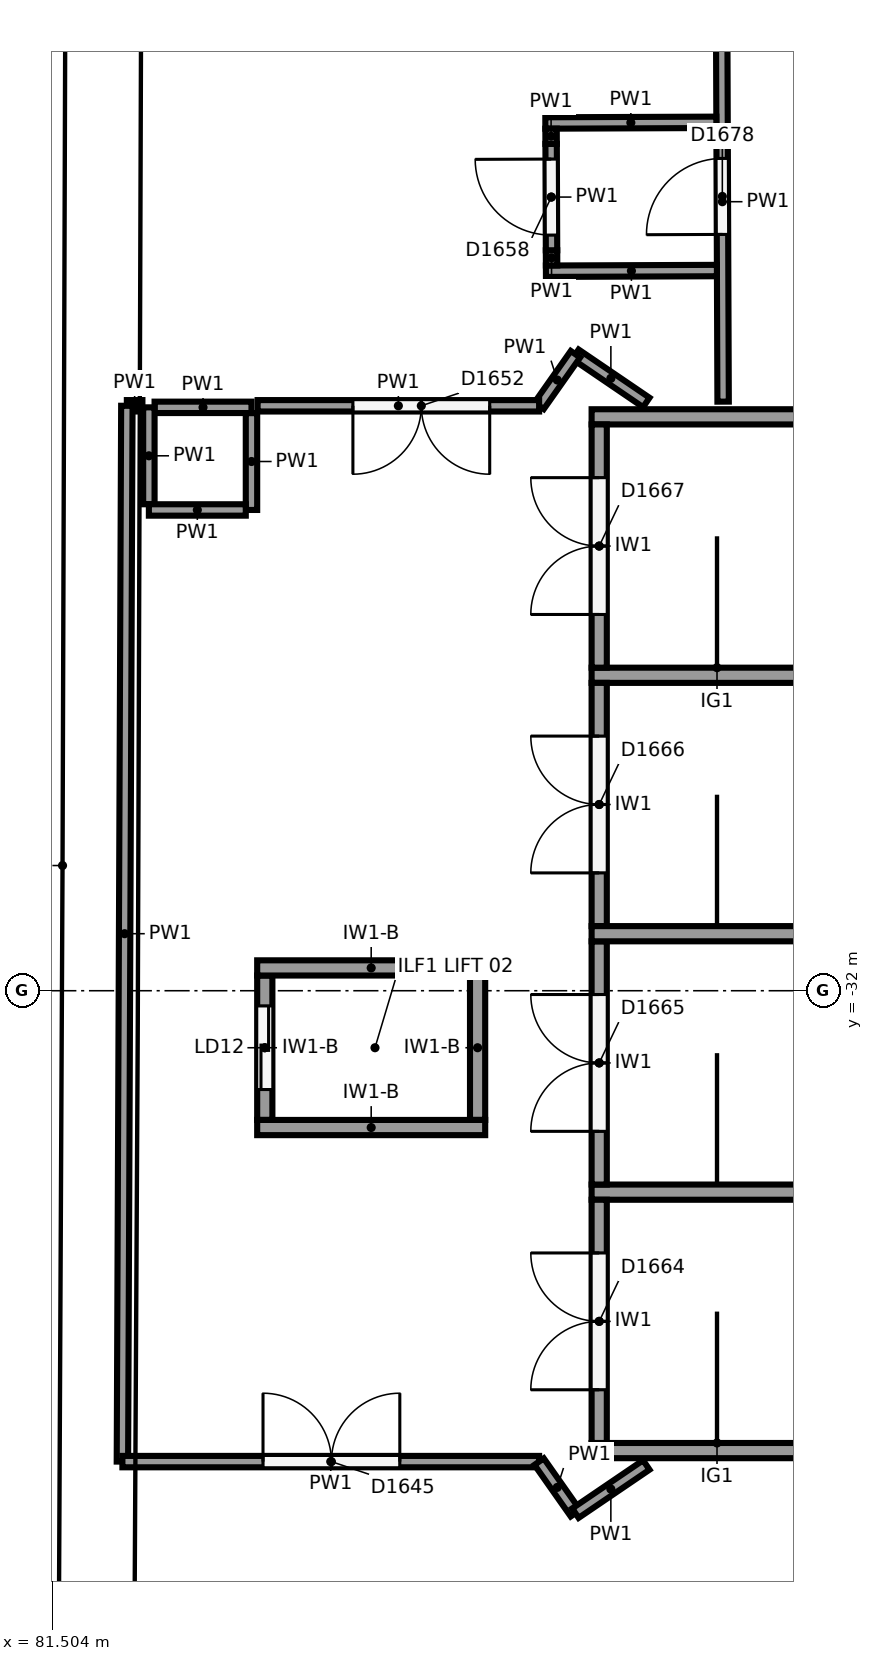
"""IFC4 building model, lengths in metres.
Left out: names, types, materials, properties, quantities, classifications, styles, units other than length and angle.
Written with IfcOpenShell. Run it as: python <this file> out.ifc"""

import sys

from ifc_helpers import new_model, si_unit, direction, frame, frame_2d, origin, origin_2d, place, context, subcontext, project, spatial, rectangle, circle, extrude, element, fill, save


model = new_model("IFC4")
c1 = context("Model", 3, precision=1e-05, world=origin(), true_north=direction((0.0, 1.0)))
c2 = subcontext(c1, "Body", "Model", "MODEL_VIEW")
j1 = project(units=[si_unit("LENGTHUNIT", "METRE"), si_unit("PLANEANGLEUNIT", "RADIAN")], contexts=[c1])
p1 = place(None, origin())
s1 = spatial("IfcSite", under=j1, at=p1, CompositionType="ELEMENT")
p2 = place(p1, origin())
s2 = spatial("IfcBuilding", under=s1, at=p2, CompositionType="ELEMENT")
p3 = place(p2, frame((0.0, 0.0, 24.0)))
s3 = spatial("IfcBuildingStorey", under=s2, at=p3, CompositionType="ELEMENT", Elevation=24.0)
p4 = place(p3, frame((84.941, -30.404, 0.0), z_axis=(0.0, 0.0, 1.0), x_axis=(1.0, 0.0, 0.0)))
e1 = element("IfcColumn", 1, at=p4, inside=s3, PredefinedType="COLUMN", context=c2, shape_type="SweptSolid", body=[
    extrude(circle(Radius=0.6, at=origin_2d()), origin(), (0.0, 0.0, 1.0), 6.0),
])
for number, where, z_axis, x_axis in (
    (2, (97.6, -38.05, 0.0), (0.0, 0.0, 1.0), (-1.0, 0.0, 0.0)),
    (3, (97.6, -31.25, 0.0), (0.0, 0.0, 1.0), (-1.0, 0.0, 0.0)),
    (4, (97.6, -24.45, 0.0), (0.0, 0.0, 1.0), (-1.0, 0.0, 0.0)),
    (5, (97.6, -34.65, 0.0), (0.0, 0.0, 1.0), (-1.0, 0.0, 0.0)),
    (6, (97.6, -27.85, 0.0), (0.0, 0.0, 1.0), (-1.0, 0.0, 0.0)),
):
    element("IfcWall", number, at=place(p3, frame(where, z_axis=z_axis, x_axis=x_axis)), inside=s3, PredefinedType="SHEAR", context=c2, shape_type="SweptSolid", body=[
        extrude(rectangle(XDim=9.0, YDim=0.2, at=frame_2d((4.5, 0.0))), origin(), (0.0, 0.0, 1.0), 5.75),
    ])
p5 = place(p3, frame((88.7, -37.95, 0.0), z_axis=(0.0, 0.0, 1.0), x_axis=(0.0, 1.0, 0.0)))
e7 = element("IfcWall", 7, at=p5, inside=s3, PredefinedType="SHEAR", context=c2, shape_type="SweptSolid", body=[
    extrude(rectangle(XDim=3.2, YDim=0.2, at=frame_2d((1.6, 0.0))), origin(), (0.0, 0.0, 1.0), 5.75),
])
p6 = place(p5, frame((0.7, 0.0, 0.0)))
e8 = element("IfcOpeningElement", 8, at=p6, cuts=e7, PredefinedType="OPENING", context=c2, shape_type="SweptSolid", body=[
    extrude(rectangle(XDim=1.8, YDim=2.1, at=frame_2d((0.9, 1.05))), frame((0.0, 0.11, 0.0), z_axis=(0.0, -1.0, 0.0), x_axis=(1.0, 0.0, 0.0)), (0.0, 0.0, 1.0), 0.22),
])
p7 = place(p3, frame((88.7, -34.55, 0.0), z_axis=(0.0, 0.0, 1.0), x_axis=(0.0, 1.0, 0.0)))
e9 = element("IfcWall", 9, at=p7, inside=s3, PredefinedType="SHEAR", context=c2, shape_type="SweptSolid", body=[
    extrude(rectangle(XDim=3.2, YDim=0.2, at=frame_2d((1.6, 0.0))), origin(), (0.0, 0.0, 1.0), 5.75),
])
p8 = place(p7, frame((0.7, 0.0, 0.0)))
e10 = element("IfcOpeningElement", 10, at=p8, cuts=e9, PredefinedType="OPENING", context=c2, shape_type="SweptSolid", body=[
    extrude(rectangle(XDim=1.8, YDim=2.1, at=frame_2d((0.9, 1.05))), frame((0.0, 0.11, 0.0), z_axis=(0.0, -1.0, 0.0), x_axis=(1.0, 0.0, 0.0)), (0.0, 0.0, 1.0), 0.22),
])
p9 = place(p3, frame((88.7, -31.15, 0.0), z_axis=(0.0, 0.0, 1.0), x_axis=(0.0, 1.0, 0.0)))
e11 = element("IfcWall", 11, at=p9, inside=s3, PredefinedType="SHEAR", context=c2, shape_type="SweptSolid", body=[
    extrude(rectangle(XDim=3.2, YDim=0.2, at=frame_2d((1.6, 0.0))), origin(), (0.0, 0.0, 1.0), 5.75),
])
p10 = place(p9, frame((0.7, 0.0, 0.0)))
e12 = element("IfcOpeningElement", 12, at=p10, cuts=e11, PredefinedType="OPENING", context=c2, shape_type="SweptSolid", body=[
    extrude(rectangle(XDim=1.8, YDim=2.1, at=frame_2d((0.9, 1.05))), frame((0.0, 0.11, 0.0), z_axis=(0.0, -1.0, 0.0), x_axis=(1.0, 0.0, 0.0)), (0.0, 0.0, 1.0), 0.22),
])
p11 = place(p3, frame((88.7, -27.75, 0.0), z_axis=(0.0, 0.0, 1.0), x_axis=(0.0, 1.0, 0.0)))
e13 = element("IfcWall", 13, at=p11, inside=s3, PredefinedType="SHEAR", context=c2, shape_type="SweptSolid", body=[
    extrude(rectangle(XDim=3.2, YDim=0.2, at=frame_2d((1.6, 0.0))), origin(), (0.0, 0.0, 1.0), 5.75),
])
p12 = place(p11, frame((0.7, 0.0, 0.0)))
e14 = element("IfcOpeningElement", 14, at=p12, cuts=e13, PredefinedType="OPENING", context=c2, shape_type="SweptSolid", body=[
    extrude(rectangle(XDim=1.8, YDim=2.1, at=frame_2d((0.9, 1.05))), frame((0.0, 0.11, 0.0), z_axis=(0.0, -1.0, 0.0), x_axis=(1.0, 0.0, 0.0)), (0.0, 0.0, 1.0), 0.22),
])
for number, where, z_axis, x_axis in (
    (15, (87.2, -33.8, 0.0), (0.0, 0.0, 1.0), (-1.0, 0.0, 0.0)),
    (16, (87.2, -31.7, 0.0), (0.0, 0.0, 1.0), (-1.0, 0.0, 0.0)),
):
    element("IfcWall", number, at=place(p3, frame(where, z_axis=z_axis, x_axis=x_axis)), inside=s3, PredefinedType="SHEAR", context=c2, shape_type="SweptSolid", body=[
        extrude(rectangle(XDim=3.0, YDim=0.2, at=frame_2d((1.5, 0.0))), origin(), (0.0, 0.0, 1.0), 4.6),
    ])
p13 = place(p3, frame((87.1, -33.7, 0.0), z_axis=(0.0, 0.0, 1.0), x_axis=(0.0, 1.0, 0.0)))
e17 = element("IfcWall", 17, at=p13, inside=s3, PredefinedType="SHEAR", context=c2, shape_type="SweptSolid", body=[
    extrude(rectangle(XDim=1.9, YDim=0.2, at=frame_2d((0.95, 0.0))), origin(), (0.0, 0.0, 1.0), 4.6),
])
p14 = place(p3, frame((84.3, -33.7, 0.0), z_axis=(0.0, 0.0, 1.0), x_axis=(0.0, 1.0, 0.0)))
e18 = element("IfcWall", 18, at=p14, inside=s3, PredefinedType="SHEAR", context=c2, shape_type="SweptSolid", body=[
    extrude(rectangle(XDim=1.9, YDim=0.2, at=frame_2d((0.95, 0.0))), origin(), (0.0, 0.0, 1.0), 4.6),
])
p15 = place(p14, frame((0.4, 0.0, 0.0)))
e19 = element("IfcOpeningElement", 19, at=p15, cuts=e18, PredefinedType="OPENING", context=c2, shape_type="SweptSolid", body=[
    extrude(rectangle(XDim=1.1, YDim=2.1, at=frame_2d((0.55, 1.05))), frame((0.0, 0.11, 0.0), z_axis=(0.0, -1.0, 0.0), x_axis=(1.0, 0.0, 0.0)), (0.0, 0.0, 1.0), 0.22),
])
p16 = place(p3, frame((90.33, -24.25, 0.0), z_axis=(0.0, 0.0, 1.0), x_axis=(-0.003805253437, 0.999992759997, 0.0)))
e20 = element("IfcWall", 20, at=p16, inside=s3, PredefinedType="PARTITIONING", context=c2, shape_type="SweptSolid", body=[
    extrude(rectangle(XDim=5.261, YDim=0.15, at=frame_2d((2.63, 0.0))), origin(), (0.0, 0.0, 1.0), 5.4),
])
p17 = place(p16, frame((2.2, 0.0, 0.0)))
e21 = element("IfcOpeningElement", 21, at=p17, cuts=e20, PredefinedType="OPENING", context=c2, shape_type="SweptSolid", body=[
    extrude(rectangle(XDim=1.0, YDim=2.1, at=frame_2d((0.5, 1.05))), frame((0.0, 0.085, 0.0), z_axis=(0.0, -1.0, 0.0), x_axis=(1.0, 0.0, 0.0)), (0.0, 0.0, 1.0), 0.17),
])
p18 = place(p3, frame((84.125, -25.675, 0.0), z_axis=(0.0, 0.0, 1.0), x_axis=(0.0, 1.0, 0.0)))
e22 = element("IfcWall", 22, at=p18, inside=s3, PredefinedType="PARTITIONING", context=c2, shape_type="SweptSolid", body=[
    extrude(rectangle(XDim=1.275, YDim=0.15, at=frame_2d((0.638, 0.0))), origin(), (0.0, 0.0, 1.0), 5.4),
])
p19 = place(p3, frame((84.125, -24.325, 0.0), z_axis=(0.0, 0.0, 1.0), x_axis=(-1.0, 0.0, 0.0)))
e23 = element("IfcWall", 23, at=p19, inside=s3, PredefinedType="PARTITIONING", context=c2, shape_type="SweptSolid", body=[
    extrude(rectangle(XDim=1.275, YDim=0.15, at=frame_2d((0.637, 0.0))), origin(), (0.0, 0.0, 1.0), 5.4),
])
for number, where, z_axis, x_axis in (
    (24, (82.775, -24.325, 0.0), (0.0, 0.0, 1.0), (0.0, -1.0, 0.0)),
    (25, (82.775, -25.675, 0.0), (0.0, 0.0, 1.0), (1.0, 0.0, 0.0)),
):
    element("IfcWall", number, at=place(p3, frame(where, z_axis=z_axis, x_axis=x_axis)), inside=s3, PredefinedType="PARTITIONING", context=c2, shape_type="SweptSolid", body=[
        extrude(rectangle(XDim=1.275, YDim=0.15, at=frame_2d((0.638, 0.0))), origin(), (0.0, 0.0, 1.0), 5.4),
    ])
p20 = place(p3, frame((82.69, -24.304, 0.0), z_axis=(0.0, 0.0, 1.0), x_axis=(-1.0, 0.0, 0.0)))
e26 = element("IfcWall", 26, at=p20, inside=s3, PredefinedType="PARTITIONING", context=c2, shape_type="SweptSolid", body=[
    extrude(rectangle(XDim=0.205, YDim=0.15, at=frame_2d((0.103, 0.0))), origin(), (0.0, 0.0, 1.0), 5.4),
])
p21 = place(p3, frame((82.485, -24.304, 0.0), z_axis=(0.0, 0.0, 1.0), x_axis=(-0.004200609734, -0.9999911774, 0.0)))
e27 = element("IfcWall", 27, at=p21, inside=s3, PredefinedType="PARTITIONING", context=c2, shape_type="SweptSolid", body=[
    extrude(rectangle(XDim=13.891, YDim=0.15, at=frame_2d((6.945, 0.0))), origin(), (0.0, 0.0, 1.0), 5.4),
])
p22 = place(p3, frame((82.427, -38.195, 0.0), z_axis=(0.0, 0.0, 1.0), x_axis=(1.0, 0.0, 0.0)))
e28 = element("IfcWall", 28, at=p22, inside=s3, PredefinedType="PARTITIONING", context=c2, shape_type="SweptSolid", body=[
    extrude(rectangle(XDim=5.482, YDim=0.15, at=frame_2d((2.741, 0.0))), origin(), (0.0, 0.0, 1.0), 5.4),
])
p23 = place(p22, frame((1.85, 0.0, 0.0)))
e29 = element("IfcOpeningElement", 29, at=p23, cuts=e28, PredefinedType="OPENING", context=c2, shape_type="SweptSolid", body=[
    extrude(rectangle(XDim=1.8, YDim=2.1, at=frame_2d((0.9, 1.05))), frame((0.0, 0.085, 0.0), z_axis=(0.0, -1.0, 0.0), x_axis=(1.0, 0.0, 0.0)), (0.0, 0.0, 1.0), 0.17),
])
p24 = place(p3, frame((87.909, -38.195, 0.0), z_axis=(0.0, 0.0, 1.0), x_axis=(0.575573582652, -0.81774999294, 0.0)))
e30 = element("IfcWall", 30, at=p24, inside=s3, PredefinedType="PARTITIONING", context=c2, shape_type="SweptSolid", body=[
    extrude(rectangle(XDim=0.83, YDim=0.15, at=frame_2d((0.415, 0.0))), origin(), (0.0, 0.0, 1.0), 5.4),
])
p25 = place(p3, frame((88.387, -38.874, 0.0), z_axis=(0.0, 0.0, 1.0), x_axis=(0.827055308354, 0.562120553728, 0.0)))
e31 = element("IfcWall", 31, at=p25, inside=s3, PredefinedType="PARTITIONING", context=c2, shape_type="SweptSolid", body=[
    extrude(rectangle(XDim=1.128, YDim=0.15, at=frame_2d((0.564, 0.0))), origin(), (0.0, 0.0, 1.0), 5.4),
])
p26 = place(p3, frame((89.32, -24.26, 0.0), z_axis=(0.0, 0.0, 1.0), x_axis=(-0.826918447352, 0.562321866398, 0.0)))
e32 = element("IfcWall", 32, at=p26, inside=s3, PredefinedType="PARTITIONING", context=c2, shape_type="SweptSolid", body=[
    extrude(rectangle(XDim=1.127, YDim=0.15, at=frame_2d((0.564, 0.0))), origin(), (0.0, 0.0, 1.0), 5.4),
])
p27 = place(p3, frame((88.387, -23.626, 0.0), z_axis=(0.0, 0.0, 1.0), x_axis=(-0.575908835733, -0.81751392216, 0.0)))
e33 = element("IfcWall", 33, at=p27, inside=s3, PredefinedType="PARTITIONING", context=c2, shape_type="SweptSolid", body=[
    extrude(rectangle(XDim=0.83, YDim=0.15, at=frame_2d((0.415, 0.0))), origin(), (0.0, 0.0, 1.0), 5.4),
])
p28 = place(p3, frame((87.909, -24.305, 0.0), z_axis=(0.0, 0.0, 1.0), x_axis=(-1.0, 0.0, 0.0)))
e34 = element("IfcWall", 34, at=p28, inside=s3, PredefinedType="PARTITIONING", context=c2, shape_type="SweptSolid", body=[
    extrude(rectangle(XDim=3.704, YDim=0.15, at=frame_2d((1.852, 0.0))), origin(), (0.0, 0.0, 1.0), 5.4),
])
p29 = place(p28, frame((0.65, 0.0, 0.0)))
e35 = element("IfcOpeningElement", 35, at=p29, cuts=e34, PredefinedType="OPENING", context=c2, shape_type="SweptSolid", body=[
    extrude(rectangle(XDim=1.8, YDim=2.1, at=frame_2d((0.9, 1.05))), frame((0.0, 0.085, 0.0), z_axis=(0.0, -1.0, 0.0), x_axis=(1.0, 0.0, 0.0)), (0.0, 0.0, 1.0), 0.17),
])
for number, where, z_axis, x_axis in (
    (36, (90.249, -22.525, 0.0), (0.0, 0.0, 1.0), (-1.0, -0.004, 0.0)),
    (37, (90.241, -20.575, 0.0), (0.0, 0.0, 1.0), (-1.0, -0.004, 0.0)),
):
    element("IfcWall", number, at=place(p3, frame(where, z_axis=z_axis, x_axis=x_axis)), inside=s3, PredefinedType="PARTITIONING", context=c2, shape_type="SweptSolid", body=[
        extrude(rectangle(XDim=2.25, YDim=0.15, at=frame_2d((1.125, 0.0))), origin(), (0.0, 0.0, 1.0), 5.4),
    ])
p30 = place(p3, frame((88.073, -22.458, 0.0), z_axis=(0.0, 0.0, 1.0), x_axis=(-0.003662979089, 0.99999329127, 0.0)))
e38 = element("IfcWall", 38, at=p30, inside=s3, PredefinedType="PARTITIONING", context=c2, shape_type="SweptSolid", body=[
    extrude(rectangle(XDim=0.2, YDim=0.15, at=frame_2d((0.1, 0.0))), origin(), (0.0, 0.0, 1.0), 5.4),
])
p31 = place(p3, frame((88.073, -22.259, 0.0), z_axis=(0.0, 0.0, 1.0), x_axis=(-0.003836734927, 0.999992639705, 0.0)))
e39 = element("IfcWall", 39, at=p31, inside=s3, PredefinedType="PARTITIONING", context=c2, shape_type="SweptSolid", body=[
    extrude(rectangle(XDim=1.4, YDim=0.15, at=frame_2d((0.7, 0.0))), origin(), (0.0, 0.0, 1.0), 5.4),
])
p32 = place(p31, frame((0.2, 0.0, 0.0)))
e40 = element("IfcOpeningElement", 40, at=p32, cuts=e39, PredefinedType="OPENING", context=c2, shape_type="SweptSolid", body=[
    extrude(rectangle(XDim=1.0, YDim=2.1, at=frame_2d((0.5, 1.05))), frame((0.0, 0.085, 0.0), z_axis=(0.0, -1.0, 0.0), x_axis=(1.0, 0.0, 0.0)), (0.0, 0.0, 1.0), 0.17),
])
p33 = place(p3, frame((88.067, -20.859, 0.0), z_axis=(0.0, 0.0, 1.0), x_axis=(-0.003662979089, 0.99999329127, 0.0)))
e41 = element("IfcWall", 41, at=p33, inside=s3, PredefinedType="PARTITIONING", context=c2, shape_type="SweptSolid", body=[
    extrude(rectangle(XDim=0.2, YDim=0.15, at=frame_2d((0.1, 0.0))), origin(), (0.0, 0.0, 1.0), 5.4),
])
p34 = place(p6, origin())
e42 = element("IfcDoor", 42, at=p34, inside=s3, OperationType="DOUBLE_DOOR_SINGLE_SWING", PredefinedType="DOOR", context=c2, shape_type="SweptSolid", body=[
    extrude(rectangle(XDim=1.8, YDim=2.1, at=frame_2d((0.9, 1.05))), frame((0.0, 0.025, 0.0), z_axis=(0.0, -1.0, 0.0), x_axis=(1.0, 0.0, 0.0)), (0.0, 0.0, 1.0), 0.05),
])
fill(e8, e42)
p35 = place(p8, origin())
e43 = element("IfcDoor", 43, at=p35, inside=s3, OperationType="DOUBLE_DOOR_SINGLE_SWING", PredefinedType="DOOR", context=c2, shape_type="SweptSolid", body=[
    extrude(rectangle(XDim=1.8, YDim=2.1, at=frame_2d((0.9, 1.05))), frame((0.0, 0.025, 0.0), z_axis=(0.0, -1.0, 0.0), x_axis=(1.0, 0.0, 0.0)), (0.0, 0.0, 1.0), 0.05),
])
fill(e10, e43)
p36 = place(p10, origin())
e44 = element("IfcDoor", 44, at=p36, inside=s3, OperationType="DOUBLE_DOOR_SINGLE_SWING", PredefinedType="DOOR", context=c2, shape_type="SweptSolid", body=[
    extrude(rectangle(XDim=1.8, YDim=2.1, at=frame_2d((0.9, 1.05))), frame((0.0, 0.025, 0.0), z_axis=(0.0, -1.0, 0.0), x_axis=(1.0, 0.0, 0.0)), (0.0, 0.0, 1.0), 0.05),
])
fill(e12, e44)
p37 = place(p12, origin())
e45 = element("IfcDoor", 45, at=p37, inside=s3, OperationType="DOUBLE_DOOR_SINGLE_SWING", PredefinedType="DOOR", context=c2, shape_type="SweptSolid", body=[
    extrude(rectangle(XDim=1.8, YDim=2.1, at=frame_2d((0.9, 1.05))), frame((0.0, 0.025, 0.0), z_axis=(0.0, -1.0, 0.0), x_axis=(1.0, 0.0, 0.0)), (0.0, 0.0, 1.0), 0.05),
])
fill(e14, e45)
p38 = place(p15, origin())
e46 = element("IfcDoor", 46, at=p38, inside=s3, OperationType="SLIDING_TO_RIGHT", PredefinedType="DOOR", context=c2, shape_type="SweptSolid", body=[
    extrude(rectangle(XDim=1.1, YDim=2.1, at=frame_2d((0.55, 1.05))), frame((0.0, 0.025, 0.0), z_axis=(0.0, -1.0, 0.0), x_axis=(1.0, 0.0, 0.0)), (0.0, 0.0, 1.0), 0.05),
])
fill(e19, e46)
p39 = place(p17, origin())
e47 = element("IfcDoor", 47, at=p39, inside=s3, OperationType="SINGLE_SWING_LEFT", PredefinedType="DOOR", context=c2, shape_type="SweptSolid", body=[
    extrude(rectangle(XDim=1.0, YDim=2.1, at=frame_2d((0.5, 1.05))), frame((0.0, 0.025, 0.0), z_axis=(0.0, -1.0, 0.0), x_axis=(1.0, 0.0, 0.0)), (0.0, 0.0, 1.0), 0.05),
])
fill(e21, e47)
p40 = place(p23, origin())
e48 = element("IfcDoor", 48, at=p40, inside=s3, OperationType="DOUBLE_DOOR_SINGLE_SWING", PredefinedType="DOOR", context=c2, shape_type="SweptSolid", body=[
    extrude(rectangle(XDim=1.8, YDim=2.1, at=frame_2d((0.9, 1.05))), frame((0.0, 0.025, 0.0), z_axis=(0.0, -1.0, 0.0), x_axis=(1.0, 0.0, 0.0)), (0.0, 0.0, 1.0), 0.05),
])
fill(e29, e48)
p41 = place(p29, origin())
e49 = element("IfcDoor", 49, at=p41, inside=s3, OperationType="DOUBLE_DOOR_SINGLE_SWING", PredefinedType="DOOR", context=c2, shape_type="SweptSolid", body=[
    extrude(rectangle(XDim=1.8, YDim=2.1, at=frame_2d((0.9, 1.05))), frame((0.0, 0.025, 0.0), z_axis=(0.0, -1.0, 0.0), x_axis=(1.0, 0.0, 0.0)), (0.0, 0.0, 1.0), 0.05),
])
fill(e35, e49)
p42 = place(p32, origin())
e50 = element("IfcDoor", 50, at=p42, inside=s3, OperationType="SINGLE_SWING_RIGHT", PredefinedType="DOOR", context=c2, shape_type="SweptSolid", body=[
    extrude(rectangle(XDim=1.0, YDim=2.1, at=frame_2d((0.5, 1.05))), frame((0.0, 0.025, 0.0), z_axis=(0.0, -1.0, 0.0), x_axis=(1.0, 0.0, 0.0)), (0.0, 0.0, 1.0), 0.05),
])
fill(e40, e50)
save(model, sys.argv[1])
